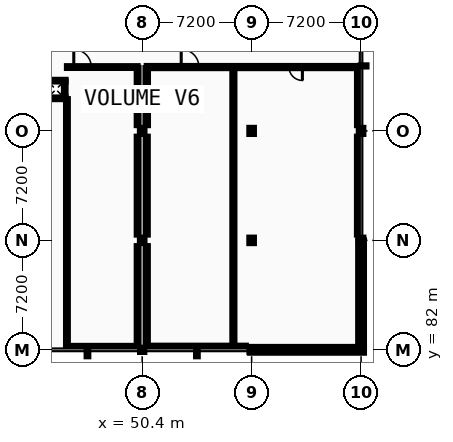
"""IFC4 building model, lengths in metres.
Left out: names, types, materials, properties, quantities, classifications, styles, units other than length and angle.
Written with IfcOpenShell. Run it as: python <this file> out.ifc"""

import sys

from ifc_helpers import new_model, si_unit, direction, frame, frame_2d, origin, origin_2d, place, context, subcontext, project, spatial, rectangle, i_section, extrude, element, fill, save


model = new_model("IFC4")
c1 = context("Model", 3, precision=1e-05, world=origin(), true_north=direction((0.0, 1.0)))
c2 = subcontext(c1, "Body", "Model", "MODEL_VIEW")
j1 = project(units=[si_unit("LENGTHUNIT", "METRE"), si_unit("PLANEANGLEUNIT", "RADIAN")], contexts=[c1])
p1 = place(None, origin())
s1 = spatial("IfcSite", under=j1, at=p1, CompositionType="ELEMENT")
p2 = place(p1, origin())
s2 = spatial("IfcBuilding", under=s1, at=p2, CompositionType="ELEMENT")
p3 = place(p2, frame((0.0, 0.0, 9.6)))
s3 = spatial("IfcBuildingStorey", under=s2, at=p3, CompositionType="ELEMENT", Elevation=9.6)
p4 = place(p3, frame((50.4, 82.0, 0.0), z_axis=(0.0, 0.0, 1.0), x_axis=(1.0, 0.0, 0.0)))
e1 = element("IfcColumn", 1, at=p4, inside=s3, PredefinedType="COLUMN", context=c2, shape_type="SweptSolid", body=[
    extrude(i_section(OverallWidth=0.28, OverallDepth=0.28, WebThickness=0.01, FlangeThickness=0.018, FilletRadius=0.024, at=origin_2d()), origin(), (0.0, 0.0, 1.0), 4.4),
])
p5 = place(p3, frame((50.4, 89.2, 0.0), z_axis=(0.0, 0.0, 1.0), x_axis=(1.0, 0.0, 0.0)))
e2 = element("IfcColumn", 2, at=p5, inside=s3, PredefinedType="COLUMN", context=c2, shape_type="SweptSolid", body=[
    extrude(i_section(OverallWidth=0.3, OverallDepth=0.36, WebThickness=0.012, FlangeThickness=0.022, FilletRadius=0.027, at=origin_2d()), origin(), (0.0, 0.0, 1.0), 4.4),
])
p6 = place(p3, frame((50.4, 96.4, 0.0), z_axis=(0.0, 0.0, 1.0), x_axis=(1.0, 0.0, 0.0)))
e3 = element("IfcColumn", 3, at=p6, inside=s3, PredefinedType="COLUMN", context=c2, shape_type="SweptSolid", body=[
    extrude(i_section(OverallWidth=0.3, OverallDepth=0.4, WebThickness=0.013, FlangeThickness=0.024, FilletRadius=0.027, at=origin_2d()), origin(), (0.0, 0.0, 1.0), 4.4),
])
p7 = place(p3, frame((57.6, 82.0, 0.0), z_axis=(0.0, 0.0, 1.0), x_axis=(1.0, 0.0, 0.0)))
e4 = element("IfcColumn", 4, at=p7, inside=s3, PredefinedType="COLUMN", context=c2, shape_type="SweptSolid", body=[
    extrude(i_section(OverallWidth=0.28, OverallDepth=0.28, WebThickness=0.01, FlangeThickness=0.018, FilletRadius=0.024, at=origin_2d()), origin(), (0.0, 0.0, 1.0), 4.4),
])
p8 = place(p3, frame((57.6, 89.2, 0.0), z_axis=(0.0, 0.0, 1.0), x_axis=(1.0, 0.0, 0.0)))
e5 = element("IfcColumn", 5, at=p8, inside=s3, PredefinedType="COLUMN", context=c2, shape_type="SweptSolid", body=[
    extrude(i_section(OverallWidth=0.3, OverallDepth=0.36, WebThickness=0.012, FlangeThickness=0.022, FilletRadius=0.027, at=origin_2d()), origin(), (0.0, 0.0, 1.0), 4.4),
])
p9 = place(p3, frame((57.6, 96.4, 0.0), z_axis=(0.0, 0.0, 1.0), x_axis=(1.0, 0.0, 0.0)))
e6 = element("IfcColumn", 6, at=p9, inside=s3, PredefinedType="COLUMN", context=c2, shape_type="SweptSolid", body=[
    extrude(i_section(OverallWidth=0.3, OverallDepth=0.4, WebThickness=0.013, FlangeThickness=0.024, FilletRadius=0.027, at=origin_2d()), origin(), (0.0, 0.0, 1.0), 4.4),
])
p10 = place(p3, frame((64.8, 82.0, 0.0), z_axis=(0.0, 0.0, 1.0), x_axis=(1.0, 0.0, 0.0)))
e7 = element("IfcColumn", 7, at=p10, inside=s3, PredefinedType="COLUMN", context=c2, shape_type="SweptSolid", body=[
    extrude(i_section(OverallWidth=0.28, OverallDepth=0.28, WebThickness=0.01, FlangeThickness=0.018, FilletRadius=0.024, at=origin_2d()), origin(), (0.0, 0.0, 1.0), 4.4),
])
p11 = place(p3, frame((64.8, 89.2, 0.0), z_axis=(0.0, 0.0, 1.0), x_axis=(1.0, 0.0, 0.0)))
e8 = element("IfcColumn", 8, at=p11, inside=s3, PredefinedType="COLUMN", context=c2, shape_type="SweptSolid", body=[
    extrude(i_section(OverallWidth=0.3, OverallDepth=0.36, WebThickness=0.012, FlangeThickness=0.022, FilletRadius=0.027, at=origin_2d()), origin(), (0.0, 0.0, 1.0), 4.4),
])
p12 = place(p3, frame((64.8, 96.4, 0.0), z_axis=(0.0, 0.0, 1.0), x_axis=(1.0, 0.0, 0.0)))
e9 = element("IfcColumn", 9, at=p12, inside=s3, PredefinedType="COLUMN", context=c2, shape_type="SweptSolid", body=[
    extrude(i_section(OverallWidth=0.3, OverallDepth=0.4, WebThickness=0.013, FlangeThickness=0.024, FilletRadius=0.027, at=origin_2d()), origin(), (0.0, 0.0, 1.0), 4.4),
])
p13 = place(p3, frame((57.49, 82.0, 0.0), z_axis=(0.0, 0.0, 1.0), x_axis=(1.0, 0.0, 0.0)))
e10 = element("IfcWall", 10, at=p13, inside=s3, PredefinedType="STANDARD", context=c2, shape_type="SweptSolid", body=[
    extrude(rectangle(XDim=7.5, YDim=0.38, at=frame_2d((3.75, 0.0))), origin(), (0.0, 0.0, 1.0), 3.9),
])
p14 = place(p13, frame((1.718, 0.0, 0.95)))
e11 = element("IfcOpeningElement", 11, at=p14, cuts=e10, PredefinedType="OPENING", context=c2, shape_type="SweptSolid", body=[
    extrude(rectangle(XDim=1.064, YDim=1.404, at=frame_2d((0.532, 0.702))), frame((0.0, 0.2, 0.0), z_axis=(0.0, -1.0, 0.0), x_axis=(1.0, 0.0, 0.0)), (0.0, 0.0, 1.0), 0.4),
])
p15 = place(p13, frame((4.718, 0.0, 0.95)))
e12 = element("IfcOpeningElement", 12, at=p15, cuts=e10, PredefinedType="OPENING", context=c2, shape_type="SweptSolid", body=[
    extrude(rectangle(XDim=1.064, YDim=1.404, at=frame_2d((0.532, 0.702))), frame((0.0, 0.2, 0.0), z_axis=(0.0, -1.0, 0.0), x_axis=(1.0, 0.0, 0.0)), (0.0, 0.0, 1.0), 0.4),
])
p16 = place(p3, frame((64.8, 82.19, 0.0), z_axis=(0.0, 0.0, 1.0), x_axis=(0.0, 1.0, 0.0)))
e13 = element("IfcWall", 13, at=p16, inside=s3, PredefinedType="STANDARD", context=c2, shape_type="SweptSolid", body=[
    extrude(rectangle(XDim=7.01, YDim=0.38, at=frame_2d((3.505, 0.0))), origin(), (0.0, 0.0, 1.0), 3.89),
])
p17 = place(p16, frame((1.203, 0.0, 0.95)))
e14 = element("IfcOpeningElement", 14, at=p17, cuts=e13, PredefinedType="OPENING", context=c2, shape_type="SweptSolid", body=[
    extrude(rectangle(XDim=1.8, YDim=1.85, at=frame_2d((0.9, 0.925))), frame((0.0, 0.2, 0.0), z_axis=(0.0, -1.0, 0.0), x_axis=(1.0, 0.0, 0.0)), (0.0, 0.0, 1.0), 0.4),
])
p18 = place(p16, frame((4.007, 0.0, 0.95)))
e15 = element("IfcOpeningElement", 15, at=p18, cuts=e13, PredefinedType="OPENING", context=c2, shape_type="SweptSolid", body=[
    extrude(rectangle(XDim=1.8, YDim=1.85, at=frame_2d((0.9, 0.925))), frame((0.0, 0.2, 0.0), z_axis=(0.0, -1.0, 0.0), x_axis=(1.0, 0.0, 0.0)), (0.0, 0.0, 1.0), 0.4),
])
for number, where, z_axis, x_axis in (
    (16, (44.09, 98.545, 0.0), (0.0, 0.0, 1.0), (1.0, 0.0, 0.0)),
    (17, (44.09, 99.705, 0.0), (0.0, 0.0, 1.0), (1.0, 0.0, 0.0)),
):
    element("IfcWall", number, at=place(p3, frame(where, z_axis=z_axis, x_axis=x_axis)), inside=s3, PredefinedType="PARTITIONING", context=c2, shape_type="SweptSolid", body=[
        extrude(rectangle(XDim=1.27, YDim=0.11, at=frame_2d((0.635, 0.0))), origin(), (0.0, 0.0, 1.0), 4.2),
    ])
p19 = place(p3, frame((45.305, 98.6, 0.0), z_axis=(0.0, 0.0, 1.0), x_axis=(0.0, 1.0, 0.0)))
e18 = element("IfcWall", 18, at=p19, inside=s3, PredefinedType="PARTITIONING", context=c2, shape_type="SweptSolid", body=[
    extrude(rectangle(XDim=1.05, YDim=0.11, at=frame_2d((0.525, 0.0))), origin(), (0.0, 0.0, 1.0), 4.2),
])
p20 = place(p3, frame((45.45, 82.2, 0.0), z_axis=(0.0, 0.0, 1.0), x_axis=(1.0, 0.0, 0.0)))
e19 = element("IfcWall", 19, at=p20, inside=s3, PredefinedType="PARTITIONING", context=c2, shape_type="SweptSolid", body=[
    extrude(rectangle(XDim=4.57, YDim=0.118, at=frame_2d((2.285, 0.0))), origin(), (0.0, 0.0, 1.0), 3.9),
])
p21 = place(p3, frame((50.78, 82.2, 0.0), z_axis=(0.0, 0.0, 1.0), x_axis=(1.0, 0.0, 0.0)))
e20 = element("IfcWall", 20, at=p21, inside=s3, PredefinedType="PARTITIONING", context=c2, shape_type="SweptSolid", body=[
    extrude(rectangle(XDim=6.44, YDim=0.142, at=frame_2d((3.22, 0.0))), origin(), (0.0, 0.0, 1.0), 3.9),
])
p22 = place(p3, frame((45.45, 100.6, 0.0), z_axis=(0.0, 0.0, 1.0), x_axis=(1.0, 0.0, 0.0)))
e21 = element("IfcWall", 21, at=p22, inside=s3, PredefinedType="PARTITIONING", context=c2, shape_type="SweptSolid", body=[
    extrude(rectangle(XDim=4.65, YDim=0.118, at=frame_2d((2.325, 0.0))), origin(), (0.0, 0.0, 1.0), 4.2),
])
p23 = place(p22, frame((0.45, 0.0, 0.0)))
e22 = element("IfcOpeningElement", 22, at=p23, cuts=e21, PredefinedType="OPENING", context=c2, shape_type="SweptSolid", body=[
    extrude(rectangle(XDim=1.15, YDim=2.15, at=frame_2d((0.575, 1.075))), frame((0.0, 0.069, 0.0), z_axis=(0.0, -1.0, 0.0), x_axis=(1.0, 0.0, 0.0)), (0.0, 0.0, 1.0), 0.138),
])
p24 = place(p3, frame((50.7, 100.6, 0.0), z_axis=(0.0, 0.0, 1.0), x_axis=(1.0, 0.0, 0.0)))
e23 = element("IfcWall", 23, at=p24, inside=s3, PredefinedType="PARTITIONING", context=c2, shape_type="SweptSolid", body=[
    extrude(rectangle(XDim=13.9, YDim=0.142, at=frame_2d((6.95, 0.0))), origin(), (0.0, 0.0, 1.0), 4.2),
])
p25 = place(p24, frame((2.267, 0.0, 0.0)))
e24 = element("IfcOpeningElement", 24, at=p25, cuts=e23, PredefinedType="OPENING", context=c2, shape_type="SweptSolid", body=[
    extrude(rectangle(XDim=1.166, YDim=2.152, at=frame_2d((0.583, 1.076))), frame((0.0, 0.081, 0.0), z_axis=(0.0, -1.0, 0.0), x_axis=(1.0, 0.0, 0.0)), (0.0, 0.0, 1.0), 0.162),
])
p26 = place(p24, frame((9.36, 0.0, 0.0)))
e25 = element("IfcOpeningElement", 25, at=p26, cuts=e23, PredefinedType="OPENING", context=c2, shape_type="SweptSolid", body=[
    extrude(rectangle(XDim=0.88, YDim=2.04, at=frame_2d((0.44, 1.02))), frame((0.0, 0.081, 0.0), z_axis=(0.0, -1.0, 0.0), x_axis=(1.0, 0.0, 0.0)), (0.0, 0.0, 1.0), 0.162),
])
p27 = place(p3, frame((45.45, 82.259, 0.0), z_axis=(0.0, 0.0, 1.0), x_axis=(0.0, 1.0, 0.0)))
e26 = element("IfcWall", 26, at=p27, inside=s3, PredefinedType="PARTITIONING", context=c2, shape_type="SweptSolid", body=[
    extrude(rectangle(XDim=16.231, YDim=0.118, at=frame_2d((8.115, 0.0))), origin(), (0.0, 0.0, 1.0), 3.915),
])
p28 = place(p3, frame((50.1, 82.38, 0.0), z_axis=(0.0, 0.0, 1.0), x_axis=(0.0, 1.0, 0.0)))
e27 = element("IfcWall", 27, at=p28, inside=s3, PredefinedType="PARTITIONING", context=c2, shape_type="SweptSolid", body=[
    extrude(rectangle(XDim=6.44, YDim=0.118, at=frame_2d((3.22, 0.0))), origin(), (0.0, 0.0, 1.0), 4.2),
])
p29 = place(p3, frame((50.1, 89.58, 0.0), z_axis=(0.0, 0.0, 1.0), x_axis=(0.0, 1.0, 0.0)))
e28 = element("IfcWall", 28, at=p29, inside=s3, PredefinedType="PARTITIONING", context=c2, shape_type="SweptSolid", body=[
    extrude(rectangle(XDim=6.44, YDim=0.118, at=frame_2d((3.22, 0.0))), origin(), (0.0, 0.0, 1.0), 4.2),
])
p30 = place(p3, frame((50.1, 96.78, 0.0), z_axis=(0.0, 0.0, 1.0), x_axis=(0.0, 1.0, 0.0)))
e29 = element("IfcWall", 29, at=p30, inside=s3, PredefinedType="PARTITIONING", context=c2, shape_type="SweptSolid", body=[
    extrude(rectangle(XDim=3.761, YDim=0.118, at=frame_2d((1.88, 0.0))), origin(), (0.0, 0.0, 1.0), 4.2),
])
p31 = place(p3, frame((50.7, 82.38, 0.0), z_axis=(0.0, 0.0, 1.0), x_axis=(0.0, 1.0, 0.0)))
e30 = element("IfcWall", 30, at=p31, inside=s3, PredefinedType="PARTITIONING", context=c2, shape_type="SweptSolid", body=[
    extrude(rectangle(XDim=6.44, YDim=0.142, at=frame_2d((3.22, 0.0))), origin(), (0.0, 0.0, 1.0), 3.9),
])
p32 = place(p3, frame((50.7, 89.58, 0.0), z_axis=(0.0, 0.0, 1.0), x_axis=(0.0, 1.0, 0.0)))
e31 = element("IfcWall", 31, at=p32, inside=s3, PredefinedType="PARTITIONING", context=c2, shape_type="SweptSolid", body=[
    extrude(rectangle(XDim=6.44, YDim=0.135, at=frame_2d((3.22, 0.0))), origin(), (0.0, 0.0, 1.0), 4.2),
])
p33 = place(p3, frame((50.7, 96.78, 0.0), z_axis=(0.0, 0.0, 1.0), x_axis=(0.0, 1.0, 0.0)))
e32 = element("IfcWall", 32, at=p33, inside=s3, PredefinedType="PARTITIONING", context=c2, shape_type="SweptSolid", body=[
    extrude(rectangle(XDim=3.749, YDim=0.16, at=frame_2d((1.875, 0.0))), origin(), (0.0, 0.0, 1.0), 3.895),
])
p34 = place(p3, frame((56.4, 82.271, 0.0), z_axis=(0.0, 0.0, 1.0), x_axis=(0.0, 1.0, 0.0)))
e33 = element("IfcWall", 33, at=p34, inside=s3, PredefinedType="PARTITIONING", context=c2, shape_type="SweptSolid", body=[
    extrude(rectangle(XDim=18.258, YDim=0.135, at=frame_2d((9.129, 0.0))), origin(), (0.0, 0.0, 1.0), 4.2),
])
p35 = place(p3, frame((64.6, 89.58, 0.0), z_axis=(0.0, 0.0, 1.0), x_axis=(0.0, 1.0, 0.0)))
e34 = element("IfcWall", 34, at=p35, inside=s3, PredefinedType="PARTITIONING", context=c2, shape_type="SweptSolid", body=[
    extrude(rectangle(XDim=6.44, YDim=0.142, at=frame_2d((3.22, 0.0))), origin(), (0.0, 0.0, 1.0), 3.885),
])
p36 = place(p3, frame((64.6, 96.78, 0.0), z_axis=(0.0, 0.0, 1.0), x_axis=(0.0, 1.0, 0.0)))
e35 = element("IfcWall", 35, at=p36, inside=s3, PredefinedType="PARTITIONING", context=c2, shape_type="SweptSolid", body=[
    extrude(rectangle(XDim=3.749, YDim=0.135, at=frame_2d((1.875, 0.0))), origin(), (0.0, 0.0, 1.0), 3.885),
])
p37 = place(p14, origin())
e36 = element("IfcWindow", 36, at=p37, inside=s3, PartitioningType="SINGLE_PANEL", PredefinedType="WINDOW", context=c2, shape_type="SweptSolid", body=[
    extrude(rectangle(XDim=1.064, YDim=1.404, at=frame_2d((0.532, 0.702))), frame((0.0, 0.03, 0.0), z_axis=(0.0, -1.0, 0.0), x_axis=(1.0, 0.0, 0.0)), (0.0, 0.0, 1.0), 0.06),
])
fill(e11, e36)
p38 = place(p15, origin())
e37 = element("IfcWindow", 37, at=p38, inside=s3, PartitioningType="SINGLE_PANEL", PredefinedType="WINDOW", context=c2, shape_type="SweptSolid", body=[
    extrude(rectangle(XDim=1.064, YDim=1.404, at=frame_2d((0.532, 0.702))), frame((0.0, 0.03, 0.0), z_axis=(0.0, -1.0, 0.0), x_axis=(1.0, 0.0, 0.0)), (0.0, 0.0, 1.0), 0.06),
])
fill(e12, e37)
p39 = place(p17, origin())
e38 = element("IfcWindow", 38, at=p39, inside=s3, PartitioningType="SINGLE_PANEL", PredefinedType="WINDOW", context=c2, shape_type="SweptSolid", body=[
    extrude(rectangle(XDim=1.8, YDim=1.85, at=frame_2d((0.9, 0.925))), frame((0.0, 0.03, 0.0), z_axis=(0.0, -1.0, 0.0), x_axis=(1.0, 0.0, 0.0)), (0.0, 0.0, 1.0), 0.06),
])
fill(e14, e38)
p40 = place(p18, origin())
e39 = element("IfcWindow", 39, at=p40, inside=s3, PartitioningType="SINGLE_PANEL", PredefinedType="WINDOW", context=c2, shape_type="SweptSolid", body=[
    extrude(rectangle(XDim=1.8, YDim=1.85, at=frame_2d((0.9, 0.925))), frame((0.0, 0.03, 0.0), z_axis=(0.0, -1.0, 0.0), x_axis=(1.0, 0.0, 0.0)), (0.0, 0.0, 1.0), 0.06),
])
fill(e15, e39)
p41 = place(p23, origin())
e40 = element("IfcDoor", 40, at=p41, inside=s3, OperationType="SINGLE_SWING_LEFT", PredefinedType="DOOR", context=c2, shape_type="SweptSolid", body=[
    extrude(rectangle(XDim=1.15, YDim=2.15, at=frame_2d((0.575, 1.075))), frame((0.0, 0.025, 0.0), z_axis=(0.0, -1.0, 0.0), x_axis=(1.0, 0.0, 0.0)), (0.0, 0.0, 1.0), 0.05),
])
fill(e22, e40)
p42 = place(p25, origin())
e41 = element("IfcDoor", 41, at=p42, inside=s3, OperationType="SINGLE_SWING_LEFT", PredefinedType="DOOR", context=c2, shape_type="SweptSolid", body=[
    extrude(rectangle(XDim=1.166, YDim=2.152, at=frame_2d((0.583, 1.076))), frame((0.0, 0.025, 0.0), z_axis=(0.0, -1.0, 0.0), x_axis=(1.0, 0.0, 0.0)), (0.0, 0.0, 1.0), 0.05),
])
fill(e24, e41)
p43 = place(p26, origin())
e42 = element("IfcDoor", 42, at=p43, inside=s3, OperationType="SINGLE_SWING_RIGHT", PredefinedType="DOOR", context=c2, shape_type="SweptSolid", body=[
    extrude(rectangle(XDim=0.88, YDim=2.04, at=frame_2d((0.44, 1.02))), frame((0.0, 0.025, 0.0), z_axis=(0.0, -1.0, 0.0), x_axis=(1.0, 0.0, 0.0)), (0.0, 0.0, 1.0), 0.05),
])
fill(e25, e42)
save(model, sys.argv[1])
